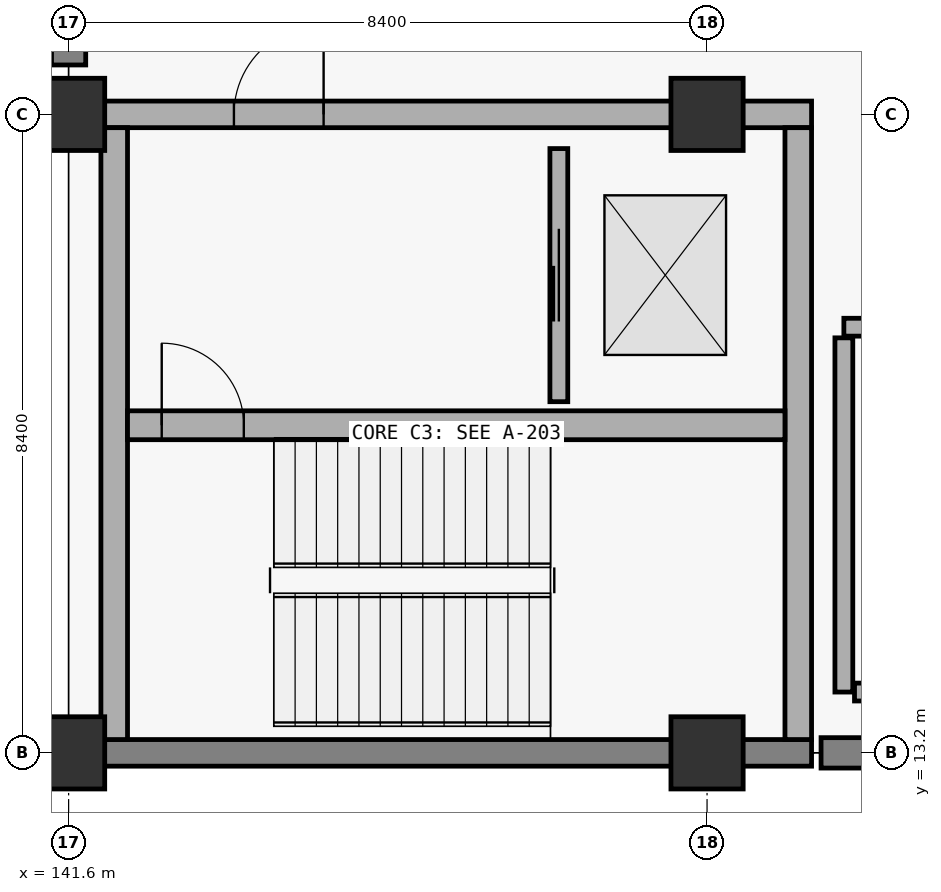
"""IFC4 building model, lengths in metres.
Left out: names, types, materials, properties, quantities, classifications, styles, units other than length and angle.
Written with IfcOpenShell. Run it as: python <this file> out.ifc"""

import sys

from ifc_helpers import new_model, si_unit, direction, frame, frame_2d, origin, origin_2d, place, context, subcontext, project, spatial, rectangle, extrude, element, fill, save


model = new_model("IFC4")
c1 = context("Model", 3, precision=1e-05, world=origin(), true_north=direction((0.0, 1.0)))
c2 = subcontext(c1, "Body", "Model", "MODEL_VIEW")
j1 = project(units=[si_unit("LENGTHUNIT", "METRE"), si_unit("PLANEANGLEUNIT", "RADIAN")], contexts=[c1])
p1 = place(None, origin())
s1 = spatial("IfcSite", under=j1, at=p1, CompositionType="ELEMENT")
p2 = place(p1, origin())
s2 = spatial("IfcBuilding", under=s1, at=p2, CompositionType="ELEMENT")
p3 = place(p2, frame((0.0, 0.0, -4.8)))
s3 = spatial("IfcBuildingStorey", under=s2, at=p3, CompositionType="ELEMENT", Elevation=-4.8)
for number, where, z_axis, x_axis in (
    (1, (141.6, 13.2, 0.0), (0.0, 0.0, 1.0), (1.0, 0.0, 0.0)),
    (2, (141.6, 21.6, 0.0), (0.0, 0.0, 1.0), (1.0, 0.0, 0.0)),
    (3, (150.0, 13.2, 0.0), (0.0, 0.0, 1.0), (1.0, 0.0, 0.0)),
    (4, (150.0, 21.6, 0.0), (0.0, 0.0, 1.0), (1.0, 0.0, 0.0)),
):
    element("IfcColumn", number, at=place(p3, frame(where, z_axis=z_axis, x_axis=x_axis)), inside=s3, PredefinedType="COLUMN", context=c2, shape_type="SweptSolid", body=[
        extrude(rectangle(XDim=0.95, YDim=0.95, at=origin_2d()), origin(), (0.0, 0.0, 1.0), 4.8),
    ])
p4 = place(p3, frame((151.375, 13.2, 0.0), z_axis=(0.0, 0.0, 1.0), x_axis=(-1.0, 0.0, 0.0)))
e5 = element("IfcWall", 5, at=p4, inside=s3, PredefinedType="SHEAR", context=c2, shape_type="SweptSolid", body=[
    extrude(rectangle(XDim=9.35, YDim=0.35, at=frame_2d((4.675, 0.0))), origin(), (0.0, 0.0, 1.0), 4.8),
])
p5 = place(p3, frame((142.025, 21.6, 0.0), z_axis=(0.0, 0.0, 1.0), x_axis=(1.0, 0.0, 0.0)))
e6 = element("IfcWall", 6, at=p5, inside=s3, PredefinedType="SHEAR", context=c2, shape_type="SweptSolid", body=[
    extrude(rectangle(XDim=9.35, YDim=0.35, at=frame_2d((4.675, 0.0))), origin(), (0.0, 0.0, 1.0), 4.8),
])
p6 = place(p5, frame((1.75, 0.0, 0.0)))
e7 = element("IfcOpeningElement", 7, at=p6, cuts=e6, PredefinedType="OPENING", context=c2, shape_type="SweptSolid", body=[
    extrude(rectangle(XDim=1.18, YDim=2.24, at=frame_2d((0.59, 1.12))), frame((0.0, 0.185, 0.0), z_axis=(0.0, -1.0, 0.0), x_axis=(1.0, 0.0, 0.0)), (0.0, 0.0, 1.0), 0.37),
])
for number, where, z_axis, x_axis in (
    (8, (142.2, 13.375, 0.0), (0.0, 0.0, 1.0), (0.0, 1.0, 0.0)),
    (9, (151.2, 13.375, 0.0), (0.0, 0.0, 1.0), (0.0, 1.0, 0.0)),
):
    element("IfcWall", number, at=place(p3, frame(where, z_axis=z_axis, x_axis=x_axis)), inside=s3, PredefinedType="SHEAR", context=c2, shape_type="SweptSolid", body=[
        extrude(rectangle(XDim=8.05, YDim=0.35, at=frame_2d((4.025, 0.0))), origin(), (0.0, 0.0, 1.0), 4.8),
    ])
p7 = place(p3, frame((142.375, 17.51, 0.0), z_axis=(0.0, 0.0, 1.0), x_axis=(1.0, 0.0, 0.0)))
e10 = element("IfcWall", 10, at=p7, inside=s3, PredefinedType="SHEAR", context=c2, shape_type="SweptSolid", body=[
    extrude(rectangle(XDim=8.65, YDim=0.38, at=frame_2d((4.325, 0.0))), origin(), (0.0, 0.0, 1.0), 4.8),
])
p8 = place(p7, frame((0.45, 0.0, 0.0)))
e11 = element("IfcOpeningElement", 11, at=p8, cuts=e10, PredefinedType="OPENING", context=c2, shape_type="SweptSolid", body=[
    extrude(rectangle(XDim=1.08, YDim=2.18, at=frame_2d((0.54, 1.09))), frame((0.0, 0.2, 0.0), z_axis=(0.0, -1.0, 0.0), x_axis=(1.0, 0.0, 0.0)), (0.0, 0.0, 1.0), 0.4),
])
p9 = place(p3, frame((151.5, 13.2, 0.0), z_axis=(0.0, 0.0, 1.0), x_axis=(1.0, 0.0, 0.0)))
e12 = element("IfcWall", 12, at=p9, inside=s3, PredefinedType="USERDEFINED", context=c2, shape_type="SweptSolid", body=[
    extrude(rectangle(XDim=6.4, YDim=0.4, at=frame_2d((3.2, 0.0))), origin(), (0.0, 0.0, 1.0), 4.8),
])
p10 = place(p3, frame((141.6, 22.25, 0.0), z_axis=(0.0, 0.0, 1.0), x_axis=(0.0, 1.0, 0.0)))
e13 = element("IfcWall", 13, at=p10, inside=s3, PredefinedType="USERDEFINED", context=c2, shape_type="SweptSolid", body=[
    extrude(rectangle(XDim=8.5, YDim=0.45, at=frame_2d((4.25, 0.0))), origin(), (0.0, 0.0, 1.0), 4.8),
])
p11 = place(p3, frame((148.05, 17.82, 0.0), z_axis=(0.0, 0.0, 1.0), x_axis=(0.0, 1.0, 0.0)))
e14 = element("IfcWall", 14, at=p11, inside=s3, PredefinedType="PARTITIONING", context=c2, shape_type="SweptSolid", body=[
    extrude(rectangle(XDim=3.33, YDim=0.235, at=frame_2d((1.665, 0.0))), origin(), (0.0, 0.0, 1.0), 2.96),
])
p12 = place(p11, frame((1.055, 0.0, 0.0)))
e15 = element("IfcOpeningElement", 15, at=p12, cuts=e14, PredefinedType="OPENING", context=c2, shape_type="SweptSolid", body=[
    extrude(rectangle(XDim=1.22, YDim=2.24, at=frame_2d((0.61, 1.12))), frame((0.0, 0.127, 0.0), z_axis=(0.0, -1.0, 0.0), x_axis=(1.0, 0.0, 0.0)), (0.0, 0.0, 1.0), 0.255),
])
p13 = place(p3, frame((151.8, 18.8, 0.0), z_axis=(0.0, 0.0, 1.0), x_axis=(1.0, 0.0, 0.0)))
e16 = element("IfcWall", 16, at=p13, inside=s3, PredefinedType="PARTITIONING", context=c2, shape_type="SweptSolid", body=[
    extrude(rectangle(XDim=4.0, YDim=0.235, at=frame_2d((2.0, 0.0))), origin(), (0.0, 0.0, 1.0), 4.36),
])
p14 = place(p13, frame((0.8, 0.0, 0.0)))
e17 = element("IfcOpeningElement", 17, at=p14, cuts=e16, PredefinedType="OPENING", context=c2, shape_type="SweptSolid", body=[
    extrude(rectangle(XDim=2.36, YDim=2.78, at=frame_2d((1.18, 1.39))), frame((0.0, 0.127, 0.0), z_axis=(0.0, -1.0, 0.0), x_axis=(1.0, 0.0, 0.0)), (0.0, 0.0, 1.0), 0.255),
])
p15 = place(p3, frame((151.8, 14.0, 0.0), z_axis=(0.0, 0.0, 1.0), x_axis=(0.0, 1.0, 0.0)))
e18 = element("IfcWall", 18, at=p15, inside=s3, PredefinedType="PARTITIONING", context=c2, shape_type="SweptSolid", body=[
    extrude(rectangle(XDim=4.66, YDim=0.235, at=frame_2d((2.33, 0.0))), origin(), (0.0, 0.0, 1.0), 4.36),
])
p16 = place(p3, frame((151.94, 14.0, 0.0), z_axis=(0.0, 0.0, 1.0), x_axis=(1.0, 0.0, 0.0)))
e19 = element("IfcWall", 19, at=p16, inside=s3, PredefinedType="PARTITIONING", context=c2, shape_type="SweptSolid", body=[
    extrude(rectangle(XDim=3.72, YDim=0.235, at=frame_2d((1.86, 0.0))), origin(), (0.0, 0.0, 1.0), 4.36),
])
p17 = place(p8, origin())
e20 = element("IfcDoor", 20, at=p17, inside=s3, OperationType="SINGLE_SWING_LEFT", PredefinedType="DOOR", context=c2, shape_type="SweptSolid", body=[
    extrude(rectangle(XDim=1.08, YDim=2.18, at=frame_2d((0.54, 1.09))), frame((0.0, 0.025, 0.0), z_axis=(0.0, -1.0, 0.0), x_axis=(1.0, 0.0, 0.0)), (0.0, 0.0, 1.0), 0.05),
])
fill(e11, e20)
p18 = place(p6, origin())
e21 = element("IfcDoor", 21, at=p18, inside=s3, OperationType="SINGLE_SWING_RIGHT", PredefinedType="DOOR", context=c2, shape_type="SweptSolid", body=[
    extrude(rectangle(XDim=1.18, YDim=2.24, at=frame_2d((0.59, 1.12))), frame((0.0, 0.025, 0.0), z_axis=(0.0, -1.0, 0.0), x_axis=(1.0, 0.0, 0.0)), (0.0, 0.0, 1.0), 0.05),
])
fill(e7, e21)
p19 = place(p12, origin())
e22 = element("IfcDoor", 22, at=p19, inside=s3, OperationType="SLIDING_TO_RIGHT", PredefinedType="DOOR", context=c2, shape_type="SweptSolid", body=[
    extrude(rectangle(XDim=1.22, YDim=2.24, at=frame_2d((0.61, 1.12))), frame((0.0, 0.025, 0.0), z_axis=(0.0, -1.0, 0.0), x_axis=(1.0, 0.0, 0.0)), (0.0, 0.0, 1.0), 0.05),
])
fill(e15, e22)
save(model, sys.argv[1])
